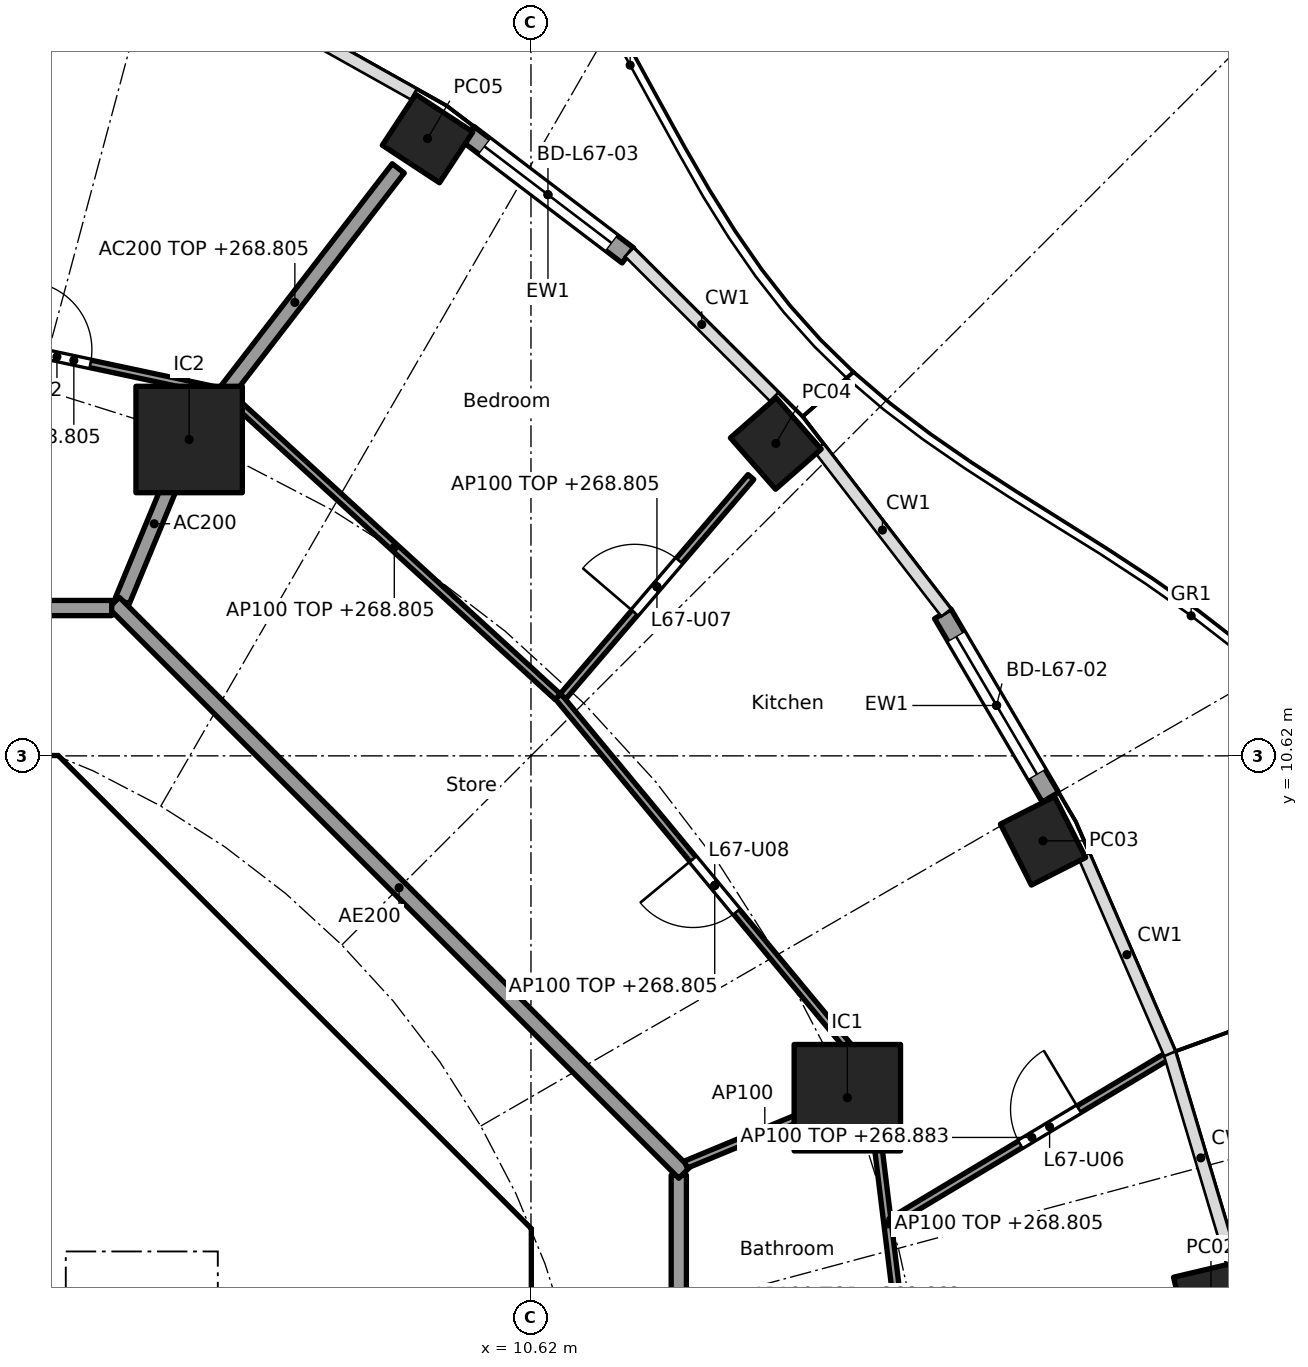
"""IFC4 building model, lengths in metres.
Left out: names, types, materials, properties, quantities, classifications, styles, units other than length and angle.
Written with IfcOpenShell. Run it as: python <this file> out.ifc"""

import sys

from ifc_helpers import new_model, si_unit, direction, frame, frame_2d, origin, origin_2d, place, context, subcontext, project, spatial, polyline, rectangle, hollow_rectangle, outline, extrude, element, fill, save


model = new_model("IFC4")
c1 = context("Model", 3, precision=1e-05, world=origin(), true_north=direction((0.0, 1.0)))
c2 = subcontext(c1, "Body", "Model", "MODEL_VIEW")
j1 = project(units=[si_unit("LENGTHUNIT", "METRE"), si_unit("PLANEANGLEUNIT", "RADIAN")], contexts=[c1])
p1 = place(None, origin())
s1 = spatial("IfcSite", under=j1, at=p1, CompositionType="ELEMENT")
p2 = place(p1, origin())
s2 = spatial("IfcBuilding", under=s1, at=p2, CompositionType="ELEMENT")
p3 = place(p2, frame((0.0, 0.0, 265.9)))
s3 = spatial("IfcBuildingStorey", under=s2, at=p3, CompositionType="ELEMENT", Elevation=265.9)
for number, where, z_axis, x_axis in (
    (1, (19.566, 3.415, 0.0), (0.0, 0.0, 1.0), (-0.229, 0.973, 0.0)),
    (2, (17.356, 9.502, 0.0), (0.0, 0.0, 1.0), (-0.452, 0.892, 0.0)),
    (3, (13.841, 14.73, 0.0), (0.0, 0.0, 1.0), (-0.66, 0.751, 0.0)),
    (4, (9.26, 18.741, 0.0), (0.0, 0.0, 1.0), (-0.836, 0.549, 0.0)),
):
    element("IfcColumn", number, at=place(p3, frame(where, z_axis=z_axis, x_axis=x_axis)), inside=s3, PredefinedType="COLUMN", context=c2, shape_type="SweptSolid", body=[
        extrude(hollow_rectangle(XDim=0.9, YDim=0.8, WallThickness=0.028, at=origin_2d()), origin(), (0.0, 0.0, 1.0), 3.7),
    ])
for number, where, z_axis, x_axis in (
    (5, (14.782, 6.123, 0.0), (0.0, 0.0, 1.0), (1.0, 0.0, 0.0)),
    (6, (6.123, 14.782, 0.0), (0.0, 0.0, 1.0), (1.0, 0.0, 0.0)),
):
    element("IfcColumn", number, at=place(p3, frame(where, z_axis=z_axis, x_axis=x_axis)), inside=s3, PredefinedType="COLUMN", context=c2, shape_type="SweptSolid", body=[
        extrude(rectangle(XDim=1.4, YDim=1.4, at=origin_2d()), origin(), (0.0, 0.0, 1.0), 3.7),
    ])
p4 = place(p3, frame((16.038, 12.489, 0.0), z_axis=(0.0, 0.0, 1.0), x_axis=(0.506371364425, -0.862315511452, 0.0)))
e7 = element("IfcWall", 7, at=p4, inside=s3, PredefinedType="SOLIDWALL", context=c2, shape_type="SweptSolid", body=[
    extrude(rectangle(XDim=2.796, YDim=0.25, at=frame_2d((1.398, 0.0))), origin(), (0.0, 0.0, 1.0), 3.44),
])
p5 = place(p4, frame((0.348, 0.0, 0.0)))
e8 = element("IfcOpeningElement", 8, at=p5, cuts=e7, PredefinedType="OPENING", context=c2, shape_type="SweptSolid", body=[
    extrude(rectangle(XDim=2.1, YDim=2.4, at=frame_2d((1.05, 1.2))), frame((0.0, 0.135, 0.0), z_axis=(0.0, -1.0, 0.0), x_axis=(1.0, 0.0, 0.0)), (0.0, 0.0, 1.0), 0.27),
])
p6 = place(p3, frame((9.792, 18.802, 0.0), z_axis=(0.0, 0.0, 1.0), x_axis=(0.796010739377, -0.605282498339, 0.0)))
e9 = element("IfcWall", 9, at=p6, inside=s3, PredefinedType="SOLIDWALL", context=c2, shape_type="SweptSolid", body=[
    extrude(rectangle(XDim=2.641, YDim=0.25, at=frame_2d((1.32, 0.0))), origin(), (0.0, 0.0, 1.0), 3.44),
])
p7 = place(p6, frame((0.27, 0.0, 0.0)))
e10 = element("IfcOpeningElement", 10, at=p7, cuts=e9, PredefinedType="OPENING", context=c2, shape_type="SweptSolid", body=[
    extrude(rectangle(XDim=2.1, YDim=2.4, at=frame_2d((1.05, 1.2))), frame((0.0, 0.135, 0.0), z_axis=(0.0, -1.0, 0.0), x_axis=(1.0, 0.0, 0.0)), (0.0, 0.0, 1.0), 0.27),
])
p8 = place(p3, frame((9.988, 4.613, 0.0), z_axis=(0.0, 0.0, 1.0), x_axis=(-0.707106781187, 0.707106781187, 0.0)))
e11 = element("IfcWall", 11, at=p8, inside=s3, PredefinedType="SHEAR", context=c2, shape_type="SweptSolid", body=[
    extrude(rectangle(XDim=7.602, YDim=0.6, at=frame_2d((3.801, 0.0))), origin(), (0.0, 0.0, 1.0), 3.44),
])
p9 = place(p8, frame((3.201, 0.0, 0.0)))
e12 = element("IfcOpeningElement", 12, at=p9, cuts=e11, PredefinedType="OPENING", context=c2, shape_type="SweptSolid", body=[
    extrude(rectangle(XDim=1.2, YDim=2.1, at=frame_2d((0.6, 1.05))), frame((0.0, 0.31, 0.0), z_axis=(0.0, -1.0, 0.0), x_axis=(1.0, 0.0, 0.0)), (0.0, 0.0, 1.0), 0.62),
])
p10 = place(p3, frame((6.7, 4.0, 0.0), z_axis=(0.0, 0.0, 1.0), x_axis=(1.0, 0.0, 0.0)))
e13 = element("IfcWall", 13, at=p10, inside=s3, PredefinedType="SOLIDWALL", context=c2, shape_type="SweptSolid", body=[
    extrude(rectangle(XDim=3.325, YDim=0.2, at=frame_2d((1.662, 0.0))), origin(), (0.0, 0.0, 1.0), 3.44),
])
p11 = place(p10, frame((1.25, 0.0, 0.0)))
e14 = element("IfcOpeningElement", 14, at=p11, cuts=e13, PredefinedType="OPENING", context=c2, shape_type="SweptSolid", body=[
    extrude(rectangle(XDim=1.1, YDim=2.1, at=frame_2d((0.55, 1.05))), frame((0.0, 0.11, 0.0), z_axis=(0.0, -1.0, 0.0), x_axis=(1.0, 0.0, 0.0)), (0.0, 0.0, 1.0), 0.22),
])
p12 = place(p3, origin())
e15 = element("IfcWall", 15, at=p12, inside=s3, PredefinedType="SHEAR", context=c2, shape_type="SweptSolid", body=[
    extrude(outline(polyline([(-4.152, 10.025), (-4.401, 9.776), (-4.825, 10.2), (-4.401, 10.625), (4.401, 10.625), (4.825, 10.2), (4.401, 9.776), (4.152, 10.025), (-4.152, 10.025)])), origin(), (0.0, 0.0, 1.0), 3.44),
])
p13 = place(p3, origin())
e16 = element("IfcWall", 16, at=p13, inside=s3, PredefinedType="SHEAR", context=c2, shape_type="SweptSolid", body=[
    extrude(outline(polyline([(9.776, -4.401), (10.025, -4.152), (10.025, -3.801), (10.025, 4.152), (9.776, 4.401), (10.2, 4.825), (10.625, 4.401), (10.625, -4.401), (10.2, -4.825), (9.776, -4.401)])), origin(), (0.0, 0.0, 1.0), 3.44),
])
p14 = place(p3, origin())
e17 = element("IfcWall", 17, at=p14, inside=s3, PredefinedType="SOLIDWALL", context=c2, shape_type="SweptSolid", body=[
    extrude(outline(polyline([(-6.7, 4.3), (6.7, 4.3), (6.7, 2.1), (6.5, 2.1), (6.5, 4.1), (4.5, 4.1), (4.5, 2.1), (4.3, 2.1), (4.3, 4.1), (2.3, 4.1), (2.3, 2.1), (2.1, 2.1), (2.1, 4.1), (0.1, 4.1), (0.1, 2.1), (-0.1, 2.1), (-0.1, 4.1), (-4.3, 4.1), (-4.3, 2.1), (-4.5, 2.1), (-4.5, 4.1), (-6.5, 4.1), (-6.5, 2.1), (-6.7, 2.1), (-6.7, 4.3)])), origin(), (0.0, 0.0, 1.0), 3.44),
])
p15 = place(p3, origin())
e18 = element("IfcWall", 18, at=p15, inside=s3, PredefinedType="SOLIDWALL", context=c2, shape_type="SweptSolid", body=[
    extrude(outline(polyline([(7.025, -3.9), (6.7, -3.9), (6.7, 3.9), (7.025, 3.9), (7.025, -3.9)])), origin(), (0.0, 0.0, 1.0), 3.44),
])
p16 = place(p3, frame((5.243, 12.657, 0.0), z_axis=(0.0, 0.0, 1.0), x_axis=(0.382691608661, 0.923876145736, 0.0)))
e19 = element("IfcWall", 19, at=p16, inside=s3, PredefinedType="PARTITIONING", context=c2, shape_type="SweptSolid", body=[
    extrude(rectangle(XDim=2.2, YDim=0.2, at=frame_2d((1.1, 0.0))), origin(), (0.0, 0.0, 1.0), 3.44),
])
p17 = place(p3, frame((6.154, 14.822, 0.0), z_axis=(0.0, 0.0, 1.0), x_axis=(0.610687612043, 0.791871606068, 0.0)))
e20 = element("IfcWall", 20, at=p17, inside=s3, PredefinedType="PARTITIONING", context=c2, shape_type="SweptSolid", body=[
    extrude(rectangle(XDim=4.455, YDim=0.2, at=frame_2d((2.228, 0.0))), origin(), (0.0, 0.0, 1.0), 2.905),
])
p18 = place(p3, frame((12.565, -5.104, 0.0), z_axis=(0.0, 0.0, 1.0), x_axis=(0.0, 1.0, 0.0)))
e21 = element("IfcWall", 21, at=p18, inside=s3, PredefinedType="PARTITIONING", context=c2, shape_type="SweptSolid", body=[
    extrude(rectangle(XDim=10.209, YDim=0.2, at=frame_2d((5.104, 0.0))), origin(), (0.0, 0.0, 1.0), 3.44),
])
p19 = place(p18, frame((4.604, 0.0, 0.0)))
e22 = element("IfcOpeningElement", 22, at=p19, cuts=e21, PredefinedType="OPENING", context=c2, shape_type="SweptSolid", body=[
    extrude(rectangle(XDim=1.0, YDim=2.1, at=frame_2d((0.5, 1.05))), frame((0.0, 0.11, 0.0), z_axis=(0.0, -1.0, 0.0), x_axis=(1.0, 0.0, 0.0)), (0.0, 0.0, 1.0), 0.22),
])
p20 = place(p3, frame((12.635, 5.134, 0.0), z_axis=(0.0, 0.0, 1.0), x_axis=(-0.707106781187, 0.707106781187, 0.0)))
e23 = element("IfcWall", 23, at=p20, inside=s3, PredefinedType="PARTITIONING", context=c2, shape_type="SweptSolid", body=[
    extrude(rectangle(XDim=10.609, YDim=0.2, at=frame_2d((5.305, 0.0))), origin(), (0.0, 0.0, 1.0), 3.44),
])
p21 = place(p3, frame((5.104, 12.565, 0.0), z_axis=(0.0, 0.0, 1.0), x_axis=(-1.0, 0.0, 0.0)))
e24 = element("IfcWall", 24, at=p21, inside=s3, PredefinedType="PARTITIONING", context=c2, shape_type="SweptSolid", body=[
    extrude(rectangle(XDim=10.409, YDim=0.2, at=frame_2d((5.205, 0.0))), origin(), (0.0, 0.0, 1.0), 3.44),
])
p22 = place(p21, frame((6.339, 0.0, 0.0)))
e25 = element("IfcOpeningElement", 25, at=p22, cuts=e24, PredefinedType="OPENING", context=c2, shape_type="SweptSolid", body=[
    extrude(rectangle(XDim=1.0, YDim=2.1, at=frame_2d((0.5, 1.05))), frame((0.0, 0.11, 0.0), z_axis=(0.0, -1.0, 0.0), x_axis=(1.0, 0.0, 0.0)), (0.0, 0.0, 1.0), 0.22),
])
p23 = place(p3, frame((15.552, 2.508, 0.0), z_axis=(0.0, 0.0, 1.0), x_axis=(-0.12196631785, 0.992534239868, 0.0)))
e26 = element("IfcWall", 26, at=p23, inside=s3, PredefinedType="PARTITIONING", context=c2, shape_type="SweptSolid", body=[
    extrude(rectangle(XDim=3.937, YDim=0.1, at=frame_2d((1.969, 0.0))), origin(), (0.0, 0.0, 1.0), 2.905),
])
p24 = place(p3, frame((15.355, 4.488, 0.0), z_axis=(0.0, 0.0, 1.0), x_axis=(0.85763237524, 0.514263268123, 0.0)))
e27 = element("IfcWall", 27, at=p24, inside=s3, PredefinedType="PARTITIONING", context=c2, shape_type="SweptSolid", body=[
    extrude(rectangle(XDim=4.324, YDim=0.1, at=frame_2d((2.162, 0.0))), origin(), (0.0, 0.0, 1.0), 2.983),
])
p25 = place(p24, frame((1.985, 0.0, 0.0)))
e28 = element("IfcOpeningElement", 28, at=p25, cuts=e27, PredefinedType="OPENING", context=c2, shape_type="SweptSolid", body=[
    extrude(rectangle(XDim=0.9, YDim=2.1, at=frame_2d((0.45, 1.05))), frame((0.0, 0.06, 0.0), z_axis=(0.0, -1.0, 0.0), x_axis=(1.0, 0.0, 0.0)), (0.0, 0.0, 1.0), 0.12),
])
p26 = place(p3, frame((12.657, 5.243, 0.0), z_axis=(0.0, 0.0, 1.0), x_axis=(0.923864733477, 0.382719158442, 0.0)))
e29 = element("IfcWall", 29, at=p26, inside=s3, PredefinedType="PARTITIONING", context=c2, shape_type="SweptSolid", body=[
    extrude(rectangle(XDim=2.25, YDim=0.1, at=frame_2d((1.125, 0.0))), origin(), (0.0, 0.0, 1.0), 3.44),
])
p27 = place(p3, frame((15.098, 6.427, 0.0), z_axis=(0.0, 0.0, 1.0), x_axis=(-0.637936555536, 0.770088924158, 0.0)))
e30 = element("IfcWall", 30, at=p27, inside=s3, PredefinedType="PARTITIONING", context=c2, shape_type="SweptSolid", body=[
    extrude(rectangle(XDim=6.46, YDim=0.1, at=frame_2d((3.23, 0.0))), origin(), (0.0, 0.0, 1.0), 2.905),
])
p28 = place(p27, frame((2.78, 0.0, 0.0)))
e31 = element("IfcOpeningElement", 31, at=p28, cuts=e30, PredefinedType="OPENING", context=c2, shape_type="SweptSolid", body=[
    extrude(rectangle(XDim=0.9, YDim=2.1, at=frame_2d((0.45, 1.05))), frame((0.0, 0.06, 0.0), z_axis=(0.0, -1.0, 0.0), x_axis=(1.0, 0.0, 0.0)), (0.0, 0.0, 1.0), 0.12),
])
p29 = place(p3, frame((11.041, 11.402, 0.0), z_axis=(0.0, 0.0, 1.0), x_axis=(0.650558544325, 0.759456108282, 0.0)))
e32 = element("IfcWall", 32, at=p29, inside=s3, PredefinedType="PARTITIONING", context=c2, shape_type="SweptSolid", body=[
    extrude(rectangle(XDim=3.8, YDim=0.1, at=frame_2d((1.9, 0.0))), origin(), (0.0, 0.0, 1.0), 2.905),
])
p30 = place(p29, frame((1.45, 0.0, 0.0)))
e33 = element("IfcOpeningElement", 33, at=p30, cuts=e32, PredefinedType="OPENING", context=c2, shape_type="SweptSolid", body=[
    extrude(rectangle(XDim=0.9, YDim=2.1, at=frame_2d((0.45, 1.05))), frame((0.0, 0.06, 0.0), z_axis=(0.0, -1.0, 0.0), x_axis=(1.0, 0.0, 0.0)), (0.0, 0.0, 1.0), 0.12),
])
p31 = place(p3, frame((10.972, 11.398, 0.0), z_axis=(0.0, 0.0, 1.0), x_axis=(-0.737830272434, 0.674986288069, 0.0)))
e34 = element("IfcWall", 34, at=p31, inside=s3, PredefinedType="PARTITIONING", context=c2, shape_type="SweptSolid", body=[
    extrude(rectangle(XDim=5.827, YDim=0.1, at=frame_2d((2.914, 0.0))), origin(), (0.0, 0.0, 1.0), 2.905),
])
p32 = place(p3, frame((6.5, 15.419, 0.0), z_axis=(0.0, 0.0, 1.0), x_axis=(-0.978053492557, 0.208353943321, 0.0)))
e35 = element("IfcWall", 35, at=p32, inside=s3, PredefinedType="PARTITIONING", context=c2, shape_type="SweptSolid", body=[
    extrude(rectangle(XDim=3.874, YDim=0.1, at=frame_2d((1.937, 0.0))), origin(), (0.0, 0.0, 1.0), 2.905),
])
p33 = place(p32, frame((1.714, 0.0, 0.0)))
e36 = element("IfcOpeningElement", 36, at=p33, cuts=e35, PredefinedType="OPENING", context=c2, shape_type="SweptSolid", body=[
    extrude(rectangle(XDim=0.9, YDim=2.1, at=frame_2d((0.45, 1.05))), frame((0.0, 0.06, 0.0), z_axis=(0.0, -1.0, 0.0), x_axis=(1.0, 0.0, 0.0)), (0.0, 0.0, 1.0), 0.12),
])
p34 = place(p5, origin())
e37 = element("IfcDoor", 37, at=p34, inside=s3, OperationType="SLIDING_TO_LEFT", PredefinedType="DOOR", context=c2, shape_type="SweptSolid", body=[
    extrude(rectangle(XDim=2.1, YDim=2.4, at=frame_2d((1.05, 1.2))), frame((0.0, 0.025, 0.0), z_axis=(0.0, -1.0, 0.0), x_axis=(1.0, 0.0, 0.0)), (0.0, 0.0, 1.0), 0.05),
])
fill(e8, e37)
p35 = place(p7, origin())
e38 = element("IfcDoor", 38, at=p35, inside=s3, OperationType="SLIDING_TO_LEFT", PredefinedType="DOOR", context=c2, shape_type="SweptSolid", body=[
    extrude(rectangle(XDim=2.1, YDim=2.4, at=frame_2d((1.05, 1.2))), frame((0.0, 0.025, 0.0), z_axis=(0.0, -1.0, 0.0), x_axis=(1.0, 0.0, 0.0)), (0.0, 0.0, 1.0), 0.05),
])
fill(e10, e38)
p36 = place(p11, frame((1.1, 0.0, 0.0), x_axis=(-1.0, 0.0, 0.0)))
e39 = element("IfcDoor", 39, at=p36, inside=s3, OperationType="SINGLE_SWING_RIGHT", PredefinedType="DOOR", context=c2, shape_type="SweptSolid", body=[
    extrude(rectangle(XDim=1.1, YDim=2.1, at=frame_2d((0.55, 1.05))), frame((0.0, 0.025, 0.0), z_axis=(0.0, -1.0, 0.0), x_axis=(1.0, 0.0, 0.0)), (0.0, 0.0, 1.0), 0.05),
])
fill(e14, e39)
p37 = place(p9, origin())
e40 = element("IfcDoor", 40, at=p37, inside=s3, OperationType="SINGLE_SWING_RIGHT", PredefinedType="DOOR", context=c2, shape_type="SweptSolid", body=[
    extrude(rectangle(XDim=1.2, YDim=2.1, at=frame_2d((0.6, 1.05))), frame((0.0, 0.025, 0.0), z_axis=(0.0, -1.0, 0.0), x_axis=(1.0, 0.0, 0.0)), (0.0, 0.0, 1.0), 0.05),
])
fill(e12, e40)
p38 = place(p25, origin())
e41 = element("IfcDoor", 41, at=p38, inside=s3, OperationType="SINGLE_SWING_RIGHT", PredefinedType="DOOR", context=c2, shape_type="SweptSolid", body=[
    extrude(rectangle(XDim=0.9, YDim=2.1, at=frame_2d((0.45, 1.05))), frame((0.0, 0.025, 0.0), z_axis=(0.0, -1.0, 0.0), x_axis=(1.0, 0.0, 0.0)), (0.0, 0.0, 1.0), 0.05),
])
fill(e28, e41)
p39 = place(p30, origin())
e42 = element("IfcDoor", 42, at=p39, inside=s3, OperationType="SINGLE_SWING_LEFT", PredefinedType="DOOR", context=c2, shape_type="SweptSolid", body=[
    extrude(rectangle(XDim=0.9, YDim=2.1, at=frame_2d((0.45, 1.05))), frame((0.0, 0.025, 0.0), z_axis=(0.0, -1.0, 0.0), x_axis=(1.0, 0.0, 0.0)), (0.0, 0.0, 1.0), 0.05),
])
fill(e33, e42)
p40 = place(p28, origin())
e43 = element("IfcDoor", 43, at=p40, inside=s3, OperationType="SINGLE_SWING_RIGHT", PredefinedType="DOOR", context=c2, shape_type="SweptSolid", body=[
    extrude(rectangle(XDim=0.9, YDim=2.1, at=frame_2d((0.45, 1.05))), frame((0.0, 0.025, 0.0), z_axis=(0.0, -1.0, 0.0), x_axis=(1.0, 0.0, 0.0)), (0.0, 0.0, 1.0), 0.05),
])
fill(e31, e43)
p41 = place(p33, frame((0.9, 0.0, 0.0), x_axis=(-1.0, 0.0, 0.0)))
e44 = element("IfcDoor", 44, at=p41, inside=s3, OperationType="SINGLE_SWING_LEFT", PredefinedType="DOOR", context=c2, shape_type="SweptSolid", body=[
    extrude(rectangle(XDim=0.9, YDim=2.1, at=frame_2d((0.45, 1.05))), frame((0.0, 0.025, 0.0), z_axis=(0.0, -1.0, 0.0), x_axis=(1.0, 0.0, 0.0)), (0.0, 0.0, 1.0), 0.05),
])
fill(e36, e44)
save(model, sys.argv[1])
